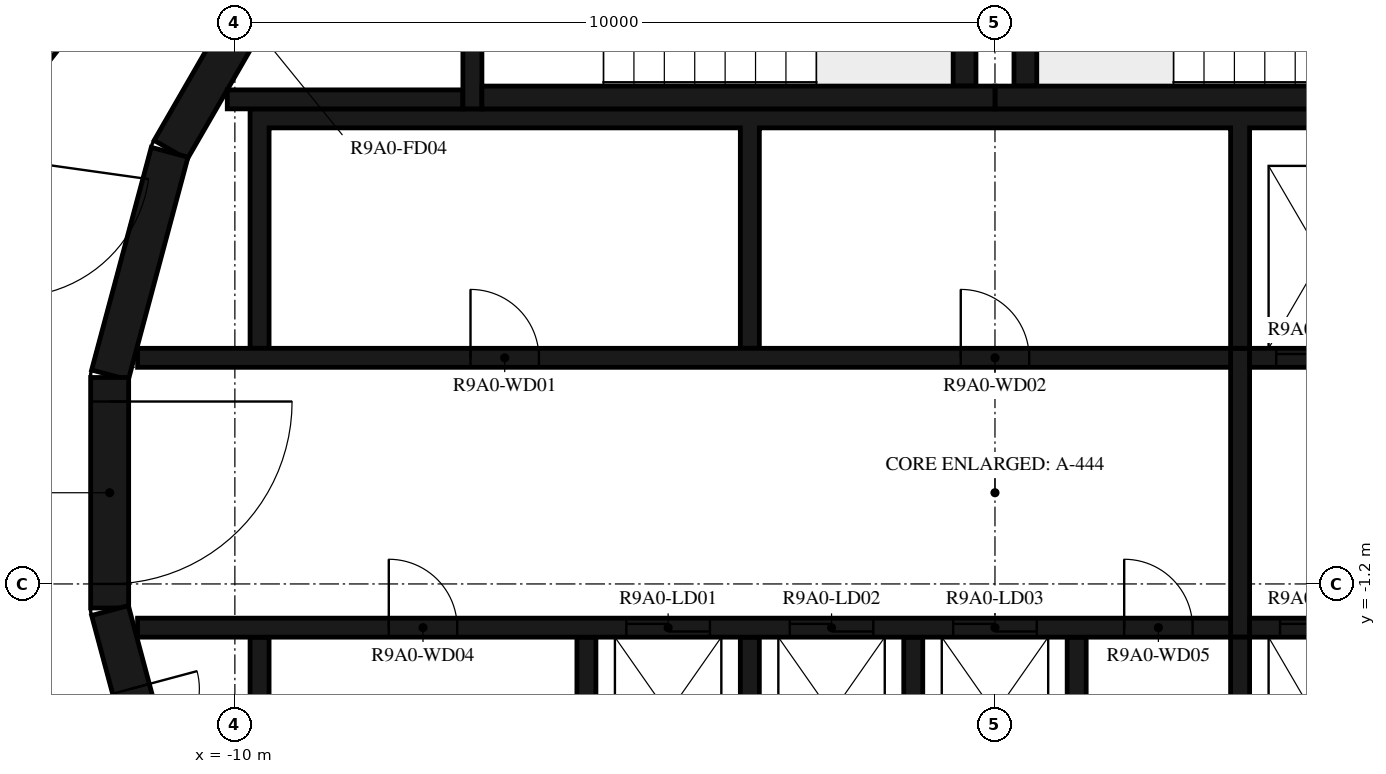
"""IFC4 building model, lengths in metres.
Left out: names, types, materials, properties, quantities, classifications, styles, units other than length and angle.
Written with IfcOpenShell. Run it as: python <this file> out.ifc"""

import sys

from ifc_helpers import new_model, si_unit, direction, frame, frame_2d, origin, place, context, subcontext, project, spatial, polyline, rectangle, outline, extrude, element, fill, save


model = new_model("IFC4")
c1 = context("Model", 3, precision=1e-05, world=origin(), true_north=direction((0.0, 1.0)))
c2 = subcontext(c1, "Body", "Model", "MODEL_VIEW")
j1 = project(units=[si_unit("LENGTHUNIT", "METRE"), si_unit("PLANEANGLEUNIT", "RADIAN")], contexts=[c1])
p1 = place(None, origin())
s1 = spatial("IfcSite", under=j1, at=p1, CompositionType="ELEMENT")
p2 = place(p1, origin())
s2 = spatial("IfcBuilding", under=s1, at=p2, CompositionType="ELEMENT")
p3 = place(p2, frame((0.0, 0.0, 340.0)))
s3 = spatial("IfcBuildingStorey", under=s2, at=p3, CompositionType="ELEMENT", Elevation=340.0)
for number, where, z_axis, x_axis in (
    (1, (-9.329, 7.137, 0.0), (0.0, 0.0, 1.0), (-0.5, -0.866, 0.0)),
    (2, (-10.858, 4.479, 0.0), (0.0, 0.0, 1.0), (-0.259, -0.966, 0.0)),
):
    element("IfcWall", number, at=place(p3, frame(where, z_axis=z_axis, x_axis=x_axis)), inside=s3, PredefinedType="SHEAR", context=c2, shape_type="SweptSolid", body=[
        extrude(rectangle(XDim=3.033, YDim=0.5, at=frame_2d((1.516, 0.0))), origin(), (0.0, 0.0, 1.0), 3.12),
    ])
p4 = place(p3, frame((-11.647, 1.516, 0.0), z_axis=(0.0, 0.0, 1.0), x_axis=(0.0, -1.0, 0.0)))
e3 = element("IfcWall", 3, at=p4, inside=s3, PredefinedType="SHEAR", context=c2, shape_type="SweptSolid", body=[
    extrude(rectangle(XDim=3.033, YDim=0.5, at=frame_2d((1.516, 0.0))), origin(), (0.0, 0.0, 1.0), 3.12),
])
p5 = place(p4, frame((0.316, 0.0, 0.0)))
e4 = element("IfcOpeningElement", 4, at=p5, cuts=e3, PredefinedType="OPENING", context=c2, shape_type="SweptSolid", body=[
    extrude(rectangle(XDim=2.4, YDim=2.1, at=frame_2d((1.2, 1.05))), frame((0.0, 0.26, 0.0), z_axis=(0.0, -1.0, 0.0), x_axis=(1.0, 0.0, 0.0)), (0.0, 0.0, 1.0), 0.52),
])
p6 = place(p3, frame((-11.643, -1.55, 0.0), z_axis=(0.0, 0.0, 1.0), x_axis=(0.258734743916, -0.965948410781, 0.0)))
e5 = element("IfcWall", 5, at=p6, inside=s3, PredefinedType="SHEAR", context=c2, shape_type="SweptSolid", body=[
    extrude(rectangle(XDim=3.033, YDim=0.5, at=frame_2d((1.516, 0.0))), origin(), (0.0, 0.0, 1.0), 3.12),
])
p7 = place(p6, frame((1.066, 0.0, 0.0)))
e6 = element("IfcOpeningElement", 6, at=p7, cuts=e5, PredefinedType="OPENING", context=c2, shape_type="SweptSolid", body=[
    extrude(rectangle(XDim=0.9, YDim=2.1, at=frame_2d((0.45, 1.05))), frame((0.0, 0.26, 0.0), z_axis=(0.0, -1.0, 0.0), x_axis=(1.0, 0.0, 0.0)), (0.0, 0.0, 1.0), 0.52),
])
p8 = place(p3, frame((0.0, 5.2, 0.0), z_axis=(0.0, 0.0, 1.0), x_axis=(1.0, 0.0, 0.0)))
e7 = element("IfcWall", 7, at=p8, inside=s3, PredefinedType="SHEAR", context=c2, shape_type="SweptSolid", body=[
    extrude(rectangle(XDim=6.75, YDim=0.3, at=frame_2d((3.375, 0.0))), origin(), (0.0, 0.0, 1.0), 3.12),
])
p9 = place(p3, frame((0.4, 5.35, 0.0), z_axis=(0.0, 0.0, 1.0), x_axis=(0.0, 1.0, 0.0)))
e8 = element("IfcWall", 8, at=p9, inside=s3, PredefinedType="SHEAR", context=c2, shape_type="SweptSolid", body=[
    extrude(rectangle(XDim=3.32, YDim=0.3, at=frame_2d((1.66, 0.0))), origin(), (0.0, 0.0, 1.0), 3.12),
])
p10 = place(p3, frame((-6.75, 5.2, 0.0), z_axis=(0.0, 0.0, 1.0), x_axis=(1.0, 0.0, 0.0)))
e9 = element("IfcWall", 9, at=p10, inside=s3, PredefinedType="SHEAR", context=c2, shape_type="SweptSolid", body=[
    extrude(rectangle(XDim=6.75, YDim=0.3, at=frame_2d((3.375, 0.0))), origin(), (0.0, 0.0, 1.0), 3.12),
])
p11 = place(p3, frame((-0.4, 5.35, 0.0), z_axis=(0.0, 0.0, 1.0), x_axis=(0.0, 1.0, 0.0)))
e10 = element("IfcWall", 10, at=p11, inside=s3, PredefinedType="SHEAR", context=c2, shape_type="SweptSolid", body=[
    extrude(rectangle(XDim=3.32, YDim=0.3, at=frame_2d((1.66, 0.0))), origin(), (0.0, 0.0, 1.0), 3.12),
])
p12 = place(p3, frame((-6.875, 8.97, 0.0), z_axis=(0.0, 0.0, 1.0), x_axis=(0.0, -1.0, 0.0)))
e11 = element("IfcWall", 11, at=p12, inside=s3, PredefinedType="SHEAR", context=c2, shape_type="SweptSolid", body=[
    extrude(rectangle(XDim=3.92, YDim=0.25, at=frame_2d((1.96, 0.0))), origin(), (0.0, 0.0, 1.0), 3.12),
])
p13 = place(p12, frame((1.61, 0.0, 0.0)))
e12 = element("IfcOpeningElement", 12, at=p13, cuts=e11, PredefinedType="OPENING", context=c2, shape_type="SweptSolid", body=[
    extrude(rectangle(XDim=1.2, YDim=2.1, at=frame_2d((0.6, 1.05))), frame((0.0, 0.135, 0.0), z_axis=(0.0, -1.0, 0.0), x_axis=(1.0, 0.0, 0.0)), (0.0, 0.0, 1.0), 0.27),
])
p14 = place(p3, frame((-7.0, 5.175, 0.0), z_axis=(0.0, 0.0, 1.0), x_axis=(-1.0, 0.0, 0.0)))
e13 = element("IfcWall", 13, at=p14, inside=s3, PredefinedType="SHEAR", context=c2, shape_type="SweptSolid", body=[
    extrude(rectangle(XDim=3.1, YDim=0.25, at=frame_2d((1.55, 0.0))), origin(), (0.0, 0.0, 1.0), 3.12),
])
p15 = place(p3, origin())
e14 = element("IfcWall", 14, at=p15, inside=s3, PredefinedType="SHEAR", context=c2, shape_type="SweptSolid", body=[
    extrude(outline(polyline([(-9.8, 1.9), (-9.55, 1.9), (-9.55, 4.8), (-3.35, 4.8), (-3.35, 1.9), (-3.1, 1.9), (-3.1, 4.8), (3.1, 4.8), (3.1, 1.9), (3.35, 1.9), (3.35, 4.8), (5.25, 4.8), (5.25, 1.9), (5.5, 1.9), (5.5, 4.8), (7.4, 4.8), (7.4, 1.9), (7.65, 1.9), (7.65, 4.8), (9.55, 4.8), (9.55, 1.9), (9.8, 1.9), (9.8, 4.8), (9.8, 5.05), (-9.8, 5.05), (-9.8, 4.8), (-9.8, 1.9)])), origin(), (0.0, 0.0, 1.0), 3.12),
])
p16 = place(p3, origin())
e15 = element("IfcWall", 15, at=p16, inside=s3, PredefinedType="SHEAR", context=c2, shape_type="SweptSolid", body=[
    extrude(outline(polyline([(9.8, -5.05), (9.8, -4.8), (9.8, -1.9), (9.55, -1.9), (9.55, -4.8), (7.65, -4.8), (7.65, -1.9), (7.4, -1.9), (7.4, -4.8), (5.5, -4.8), (5.5, -1.9), (5.25, -1.9), (5.25, -4.8), (3.35, -4.8), (3.35, -1.9), (3.1, -1.9), (3.1, -4.8), (1.2, -4.8), (1.2, -1.9), (0.95, -1.9), (0.95, -4.8), (-0.95, -4.8), (-0.95, -1.9), (-1.2, -1.9), (-1.2, -4.8), (-3.1, -4.8), (-3.1, -1.9), (-3.35, -1.9), (-3.35, -4.8), (-5.25, -4.8), (-5.25, -1.9), (-5.5, -1.9), (-5.5, -4.8), (-9.55, -4.8), (-9.55, -1.9), (-9.8, -1.9), (-9.8, -4.8), (-9.8, -5.05), (9.8, -5.05)])), origin(), (0.0, 0.0, 1.0), 3.12),
])
p17 = place(p3, frame((-11.28, 1.775, 0.0), z_axis=(0.0, 0.0, 1.0), x_axis=(1.0, 0.0, 0.0)))
e16 = element("IfcWall", 16, at=p17, inside=s3, PredefinedType="SHEAR", context=c2, shape_type="SweptSolid", body=[
    extrude(rectangle(XDim=14.38, YDim=0.25, at=frame_2d((7.19, 0.0))), origin(), (0.0, 0.0, 1.0), 3.12),
])
p18 = place(p17, frame((4.38, 0.0, 0.0)))
e17 = element("IfcOpeningElement", 17, at=p18, cuts=e16, PredefinedType="OPENING", context=c2, shape_type="SweptSolid", body=[
    extrude(rectangle(XDim=0.9, YDim=2.1, at=frame_2d((0.45, 1.05))), frame((0.0, 0.135, 0.0), z_axis=(0.0, -1.0, 0.0), x_axis=(1.0, 0.0, 0.0)), (0.0, 0.0, 1.0), 0.27),
])
p19 = place(p17, frame((10.83, 0.0, 0.0)))
e18 = element("IfcOpeningElement", 18, at=p19, cuts=e16, PredefinedType="OPENING", context=c2, shape_type="SweptSolid", body=[
    extrude(rectangle(XDim=0.9, YDim=2.1, at=frame_2d((0.45, 1.05))), frame((0.0, 0.135, 0.0), z_axis=(0.0, -1.0, 0.0), x_axis=(1.0, 0.0, 0.0)), (0.0, 0.0, 1.0), 0.27),
])
p20 = place(p3, frame((3.35, 1.775, 0.0), z_axis=(0.0, 0.0, 1.0), x_axis=(1.0, 0.0, 0.0)))
e19 = element("IfcWall", 19, at=p20, inside=s3, PredefinedType="SHEAR", context=c2, shape_type="SweptSolid", body=[
    extrude(rectangle(XDim=7.93, YDim=0.25, at=frame_2d((3.965, 0.0))), origin(), (0.0, 0.0, 1.0), 3.12),
])
p21 = place(p20, frame((0.35, 0.0, 0.0)))
e20 = element("IfcOpeningElement", 20, at=p21, cuts=e19, PredefinedType="OPENING", context=c2, shape_type="SweptSolid", body=[
    extrude(rectangle(XDim=1.2, YDim=2.4, at=frame_2d((0.6, 1.2))), frame((0.0, 0.135, 0.0), z_axis=(0.0, -1.0, 0.0), x_axis=(1.0, 0.0, 0.0)), (0.0, 0.0, 1.0), 0.27),
])
p22 = place(p20, frame((2.5, 0.0, 0.0)))
e21 = element("IfcOpeningElement", 21, at=p22, cuts=e19, PredefinedType="OPENING", context=c2, shape_type="SweptSolid", body=[
    extrude(rectangle(XDim=1.2, YDim=2.4, at=frame_2d((0.6, 1.2))), frame((0.0, 0.135, 0.0), z_axis=(0.0, -1.0, 0.0), x_axis=(1.0, 0.0, 0.0)), (0.0, 0.0, 1.0), 0.27),
])
p23 = place(p20, frame((4.8, 0.0, 0.0)))
e22 = element("IfcOpeningElement", 22, at=p23, cuts=e19, PredefinedType="OPENING", context=c2, shape_type="SweptSolid", body=[
    extrude(rectangle(XDim=0.9, YDim=2.1, at=frame_2d((0.45, 1.05))), frame((0.0, 0.135, 0.0), z_axis=(0.0, -1.0, 0.0), x_axis=(1.0, 0.0, 0.0)), (0.0, 0.0, 1.0), 0.27),
])
p24 = place(p3, frame((-11.28, -1.775, 0.0), z_axis=(0.0, 0.0, 1.0), x_axis=(1.0, 0.0, 0.0)))
e23 = element("IfcWall", 23, at=p24, inside=s3, PredefinedType="SHEAR", context=c2, shape_type="SweptSolid", body=[
    extrude(rectangle(XDim=14.38, YDim=0.25, at=frame_2d((7.19, 0.0))), origin(), (0.0, 0.0, 1.0), 3.12),
])
p25 = place(p24, frame((6.43, 0.0, 0.0)))
e24 = element("IfcOpeningElement", 24, at=p25, cuts=e23, PredefinedType="OPENING", context=c2, shape_type="SweptSolid", body=[
    extrude(rectangle(XDim=1.1, YDim=2.1, at=frame_2d((0.55, 1.05))), frame((0.0, 0.135, 0.0), z_axis=(0.0, -1.0, 0.0), x_axis=(1.0, 0.0, 0.0)), (0.0, 0.0, 1.0), 0.27),
])
p26 = place(p24, frame((8.58, 0.0, 0.0)))
e25 = element("IfcOpeningElement", 25, at=p26, cuts=e23, PredefinedType="OPENING", context=c2, shape_type="SweptSolid", body=[
    extrude(rectangle(XDim=1.1, YDim=2.1, at=frame_2d((0.55, 1.05))), frame((0.0, 0.135, 0.0), z_axis=(0.0, -1.0, 0.0), x_axis=(1.0, 0.0, 0.0)), (0.0, 0.0, 1.0), 0.27),
])
p27 = place(p24, frame((10.73, 0.0, 0.0)))
e26 = element("IfcOpeningElement", 26, at=p27, cuts=e23, PredefinedType="OPENING", context=c2, shape_type="SweptSolid", body=[
    extrude(rectangle(XDim=1.1, YDim=2.1, at=frame_2d((0.55, 1.05))), frame((0.0, 0.135, 0.0), z_axis=(0.0, -1.0, 0.0), x_axis=(1.0, 0.0, 0.0)), (0.0, 0.0, 1.0), 0.27),
])
p28 = place(p24, frame((3.305, 0.0, 0.0)))
e27 = element("IfcOpeningElement", 27, at=p28, cuts=e23, PredefinedType="OPENING", context=c2, shape_type="SweptSolid", body=[
    extrude(rectangle(XDim=0.9, YDim=2.1, at=frame_2d((0.45, 1.05))), frame((0.0, 0.135, 0.0), z_axis=(0.0, -1.0, 0.0), x_axis=(1.0, 0.0, 0.0)), (0.0, 0.0, 1.0), 0.27),
])
p29 = place(p24, frame((12.98, 0.0, 0.0)))
e28 = element("IfcOpeningElement", 28, at=p29, cuts=e23, PredefinedType="OPENING", context=c2, shape_type="SweptSolid", body=[
    extrude(rectangle(XDim=0.9, YDim=2.1, at=frame_2d((0.45, 1.05))), frame((0.0, 0.135, 0.0), z_axis=(0.0, -1.0, 0.0), x_axis=(1.0, 0.0, 0.0)), (0.0, 0.0, 1.0), 0.27),
])
p30 = place(p3, frame((3.35, -1.775, 0.0), z_axis=(0.0, 0.0, 1.0), x_axis=(1.0, 0.0, 0.0)))
e29 = element("IfcWall", 29, at=p30, inside=s3, PredefinedType="SHEAR", context=c2, shape_type="SweptSolid", body=[
    extrude(rectangle(XDim=7.93, YDim=0.25, at=frame_2d((3.965, 0.0))), origin(), (0.0, 0.0, 1.0), 3.12),
])
p31 = place(p30, frame((0.4, 0.0, 0.0)))
e30 = element("IfcOpeningElement", 30, at=p31, cuts=e29, PredefinedType="OPENING", context=c2, shape_type="SweptSolid", body=[
    extrude(rectangle(XDim=1.1, YDim=2.4, at=frame_2d((0.55, 1.2))), frame((0.0, 0.135, 0.0), z_axis=(0.0, -1.0, 0.0), x_axis=(1.0, 0.0, 0.0)), (0.0, 0.0, 1.0), 0.27),
])
p32 = place(p30, frame((2.55, 0.0, 0.0)))
e31 = element("IfcOpeningElement", 31, at=p32, cuts=e29, PredefinedType="OPENING", context=c2, shape_type="SweptSolid", body=[
    extrude(rectangle(XDim=1.1, YDim=2.4, at=frame_2d((0.55, 1.2))), frame((0.0, 0.135, 0.0), z_axis=(0.0, -1.0, 0.0), x_axis=(1.0, 0.0, 0.0)), (0.0, 0.0, 1.0), 0.27),
])
p33 = place(p30, frame((4.7, 0.0, 0.0)))
e32 = element("IfcOpeningElement", 32, at=p33, cuts=e29, PredefinedType="OPENING", context=c2, shape_type="SweptSolid", body=[
    extrude(rectangle(XDim=1.1, YDim=2.4, at=frame_2d((0.55, 1.2))), frame((0.0, 0.135, 0.0), z_axis=(0.0, -1.0, 0.0), x_axis=(1.0, 0.0, 0.0)), (0.0, 0.0, 1.0), 0.27),
])
p34 = place(p3, frame((3.225, -1.9, 0.0), z_axis=(0.0, 0.0, 1.0), x_axis=(0.0, 1.0, 0.0)))
e33 = element("IfcWall", 33, at=p34, inside=s3, PredefinedType="SHEAR", context=c2, shape_type="SweptSolid", body=[
    extrude(rectangle(XDim=3.8, YDim=0.25, at=frame_2d((1.9, 0.0))), origin(), (0.0, 0.0, 1.0), 3.12),
])
p35 = place(p3, frame((-13.769, -1.691, 0.0), z_axis=(0.0, 0.0, 1.0), x_axis=(0.372720094028, -0.927943819155, 0.0)))
e34 = element("IfcWall", 34, at=p35, inside=s3, PredefinedType="STANDARD", context=c2, shape_type="SweptSolid", body=[
    extrude(rectangle(XDim=4.875, YDim=0.2, at=frame_2d((2.438, 0.0))), origin(), (0.0, 0.0, 1.0), 3.12),
])
p36 = place(p3, frame((-8.349, 11.079, 0.0), z_axis=(0.0, 0.0, 1.0), x_axis=(-0.615669112324, -0.78800478687, 0.0)))
e35 = element("IfcWall", 35, at=p36, inside=s3, PredefinedType="STANDARD", context=c2, shape_type="SweptSolid", body=[
    extrude(rectangle(XDim=7.181, YDim=0.2, at=frame_2d((3.591, 0.0))), origin(), (0.0, 0.0, 1.0), 3.12),
])
p37 = place(p36, frame((2.1, 0.0, 0.0)))
e36 = element("IfcOpeningElement", 36, at=p37, cuts=e35, PredefinedType="OPENING", context=c2, shape_type="SweptSolid", body=[
    extrude(rectangle(XDim=1.0, YDim=2.1, at=frame_2d((0.5, 1.05))), frame((0.0, 0.11, 0.0), z_axis=(0.0, -1.0, 0.0), x_axis=(1.0, 0.0, 0.0)), (0.0, 0.0, 1.0), 0.22),
])
p38 = place(p36, frame((3.811, 0.0, 0.0)))
e37 = element("IfcOpeningElement", 37, at=p38, cuts=e35, PredefinedType="OPENING", context=c2, shape_type="SweptSolid", body=[
    extrude(rectangle(XDim=1.0, YDim=2.1, at=frame_2d((0.5, 1.05))), frame((0.0, 0.11, 0.0), z_axis=(0.0, -1.0, 0.0), x_axis=(1.0, 0.0, 0.0)), (0.0, 0.0, 1.0), 0.22),
])
p39 = place(p5, origin())
e38 = element("IfcDoor", 38, at=p39, inside=s3, OperationType="DOUBLE_DOOR_SINGLE_SWING", PredefinedType="DOOR", context=c2, shape_type="SweptSolid", body=[
    extrude(rectangle(XDim=2.4, YDim=2.1, at=frame_2d((1.2, 1.05))), frame((0.0, 0.025, 0.0), z_axis=(0.0, -1.0, 0.0), x_axis=(1.0, 0.0, 0.0)), (0.0, 0.0, 1.0), 0.05),
])
fill(e4, e38)
p40 = place(p21, origin())
e39 = element("IfcDoor", 39, at=p40, inside=s3, OperationType="DOUBLE_DOOR_SLIDING", PredefinedType="DOOR", context=c2, shape_type="SweptSolid", body=[
    extrude(rectangle(XDim=1.2, YDim=2.4, at=frame_2d((0.6, 1.2))), frame((0.0, 0.025, 0.0), z_axis=(0.0, -1.0, 0.0), x_axis=(1.0, 0.0, 0.0)), (0.0, 0.0, 1.0), 0.05),
])
fill(e20, e39)
p41 = place(p25, origin())
e40 = element("IfcDoor", 40, at=p41, inside=s3, OperationType="DOUBLE_DOOR_SLIDING", PredefinedType="DOOR", context=c2, shape_type="SweptSolid", body=[
    extrude(rectangle(XDim=1.1, YDim=2.1, at=frame_2d((0.55, 1.05))), frame((0.0, 0.025, 0.0), z_axis=(0.0, -1.0, 0.0), x_axis=(1.0, 0.0, 0.0)), (0.0, 0.0, 1.0), 0.05),
])
fill(e24, e40)
p42 = place(p26, origin())
e41 = element("IfcDoor", 41, at=p42, inside=s3, OperationType="DOUBLE_DOOR_SLIDING", PredefinedType="DOOR", context=c2, shape_type="SweptSolid", body=[
    extrude(rectangle(XDim=1.1, YDim=2.1, at=frame_2d((0.55, 1.05))), frame((0.0, 0.025, 0.0), z_axis=(0.0, -1.0, 0.0), x_axis=(1.0, 0.0, 0.0)), (0.0, 0.0, 1.0), 0.05),
])
fill(e25, e41)
p43 = place(p27, origin())
e42 = element("IfcDoor", 42, at=p43, inside=s3, OperationType="DOUBLE_DOOR_SLIDING", PredefinedType="DOOR", context=c2, shape_type="SweptSolid", body=[
    extrude(rectangle(XDim=1.1, YDim=2.1, at=frame_2d((0.55, 1.05))), frame((0.0, 0.025, 0.0), z_axis=(0.0, -1.0, 0.0), x_axis=(1.0, 0.0, 0.0)), (0.0, 0.0, 1.0), 0.05),
])
fill(e26, e42)
p44 = place(p31, origin())
e43 = element("IfcDoor", 43, at=p44, inside=s3, OperationType="DOUBLE_DOOR_SLIDING", PredefinedType="DOOR", context=c2, shape_type="SweptSolid", body=[
    extrude(rectangle(XDim=1.1, YDim=2.4, at=frame_2d((0.55, 1.2))), frame((0.0, 0.025, 0.0), z_axis=(0.0, -1.0, 0.0), x_axis=(1.0, 0.0, 0.0)), (0.0, 0.0, 1.0), 0.05),
])
fill(e30, e43)
p45 = place(p18, origin())
e44 = element("IfcDoor", 44, at=p45, inside=s3, OperationType="SINGLE_SWING_LEFT", PredefinedType="DOOR", context=c2, shape_type="SweptSolid", body=[
    extrude(rectangle(XDim=0.9, YDim=2.1, at=frame_2d((0.45, 1.05))), frame((0.0, 0.025, 0.0), z_axis=(0.0, -1.0, 0.0), x_axis=(1.0, 0.0, 0.0)), (0.0, 0.0, 1.0), 0.05),
])
fill(e17, e44)
p46 = place(p19, origin())
e45 = element("IfcDoor", 45, at=p46, inside=s3, OperationType="SINGLE_SWING_RIGHT", PredefinedType="DOOR", context=c2, shape_type="SweptSolid", body=[
    extrude(rectangle(XDim=0.9, YDim=2.1, at=frame_2d((0.45, 1.05))), frame((0.0, 0.025, 0.0), z_axis=(0.0, -1.0, 0.0), x_axis=(1.0, 0.0, 0.0)), (0.0, 0.0, 1.0), 0.05),
])
fill(e18, e45)
p47 = place(p28, origin())
e46 = element("IfcDoor", 46, at=p47, inside=s3, OperationType="SINGLE_SWING_RIGHT", PredefinedType="DOOR", context=c2, shape_type="SweptSolid", body=[
    extrude(rectangle(XDim=0.9, YDim=2.1, at=frame_2d((0.45, 1.05))), frame((0.0, 0.025, 0.0), z_axis=(0.0, -1.0, 0.0), x_axis=(1.0, 0.0, 0.0)), (0.0, 0.0, 1.0), 0.05),
])
fill(e27, e46)
p48 = place(p29, origin())
e47 = element("IfcDoor", 47, at=p48, inside=s3, OperationType="SINGLE_SWING_LEFT", PredefinedType="DOOR", context=c2, shape_type="SweptSolid", body=[
    extrude(rectangle(XDim=0.9, YDim=2.1, at=frame_2d((0.45, 1.05))), frame((0.0, 0.025, 0.0), z_axis=(0.0, -1.0, 0.0), x_axis=(1.0, 0.0, 0.0)), (0.0, 0.0, 1.0), 0.05),
])
fill(e28, e47)
p49 = place(p7, origin())
e48 = element("IfcDoor", 48, at=p49, inside=s3, OperationType="SINGLE_SWING_RIGHT", PredefinedType="DOOR", context=c2, shape_type="SweptSolid", body=[
    extrude(rectangle(XDim=0.9, YDim=2.1, at=frame_2d((0.45, 1.05))), frame((0.0, 0.025, 0.0), z_axis=(0.0, -1.0, 0.0), x_axis=(1.0, 0.0, 0.0)), (0.0, 0.0, 1.0), 0.05),
])
fill(e6, e48)
save(model, sys.argv[1])
